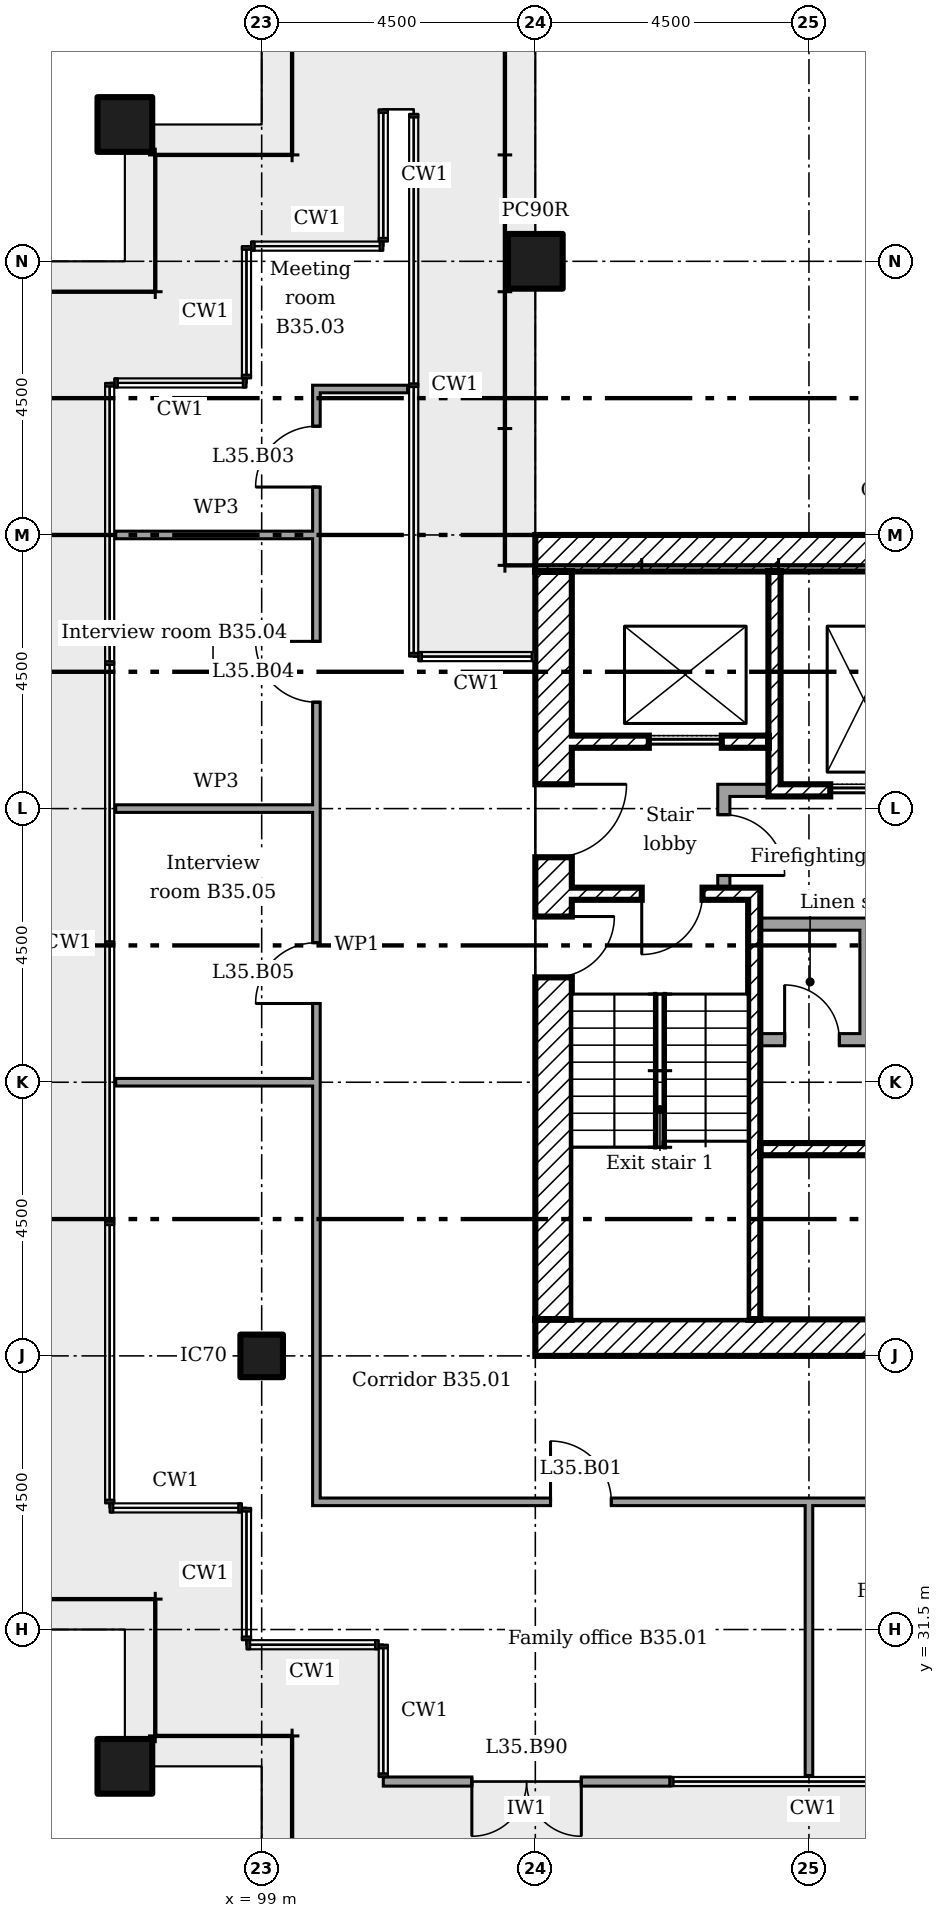
"""IFC4 building model, lengths in metres.
Left out: names, types, materials, properties, quantities, classifications, styles, units other than length and angle.
Written with IfcOpenShell. Run it as: python <this file> out.ifc"""

import sys

from ifc_helpers import new_model, si_unit, direction, frame, frame_2d, origin, origin_2d, place, context, subcontext, project, spatial, rectangle, extrude, element, fill, save


model = new_model("IFC4")
c1 = context("Model", 3, precision=1e-05, world=origin(), true_north=direction((0.0, 1.0)))
c2 = subcontext(c1, "Body", "Model", "MODEL_VIEW")
j1 = project(units=[si_unit("LENGTHUNIT", "METRE"), si_unit("PLANEANGLEUNIT", "RADIAN")], contexts=[c1])
p1 = place(None, origin())
s1 = spatial("IfcSite", under=j1, at=p1, CompositionType="ELEMENT")
p2 = place(p1, origin())
s2 = spatial("IfcBuilding", under=s1, at=p2, CompositionType="ELEMENT")
p3 = place(p2, frame((0.0, 0.0, 143.8)))
s3 = spatial("IfcBuildingStorey", under=s2, at=p3, CompositionType="ELEMENT", Elevation=143.8)
for number, where in (
    (1, (103.5, 54.0, 0.0)),
    (2, (96.75, 56.25, 0.0)),
    (3, (96.75, 29.25, 0.0)),
):
    element("IfcColumn", number, at=place(p3, frame(where)), inside=s3, PredefinedType="COLUMN", context=c2, shape_type="SweptSolid", body=[
        extrude(rectangle(XDim=0.9, YDim=0.9, at=origin_2d()), origin(), (0.0, 0.0, 1.0), 3.6),
    ])
p4 = place(p3, frame((99.0, 36.0, 0.0)))
e4 = element("IfcColumn", 4, at=p4, inside=s3, PredefinedType="COLUMN", context=c2, shape_type="SweptSolid", body=[
    extrude(rectangle(XDim=0.7, YDim=0.7, at=origin_2d()), origin(), (0.0, 0.0, 1.0), 3.6),
])
p5 = place(p3, frame((101.0, 29.0, 0.0)))
e5 = element("IfcWall", 5, at=p5, inside=s3, PredefinedType="SOLIDWALL", context=c2, shape_type="SweptSolid", body=[
    extrude(rectangle(XDim=4.712, YDim=0.15, at=frame_2d((2.356, 0.0))), origin(), (0.0, 0.0, 1.0), 3.45),
])
p6 = place(p5, frame((1.456, 0.0, 0.0)))
e6 = element("IfcOpeningElement", 6, at=p6, cuts=e5, PredefinedType="OPENING", context=c2, shape_type="SweptSolid", body=[
    extrude(rectangle(XDim=1.8, YDim=2.4, at=frame_2d((0.9, 1.2))), frame((0.0, 0.085, 0.0), z_axis=(0.0, -1.0, 0.0), x_axis=(1.0, 0.0, 0.0)), (0.0, 0.0, 1.0), 0.17),
])
for number, where in (
    (7, (103.5, 49.2, 0.0)),
    (8, (103.5, 36.3, 0.0)),
):
    element("IfcWall", number, at=place(p3, frame(where)), inside=s3, PredefinedType="SHEAR", context=c2, shape_type="SweptSolid", body=[
        extrude(rectangle(XDim=12.9, YDim=0.6, at=frame_2d((6.45, 0.0))), origin(), (0.0, 0.0, 1.0), 3.35),
    ])
p7 = place(p3, frame((103.8, 36.6, 0.0), z_axis=(0.0, 0.0, 1.0), x_axis=(0.0, 1.0, 0.0)))
e9 = element("IfcWall", 9, at=p7, inside=s3, PredefinedType="SHEAR", context=c2, shape_type="SweptSolid", body=[
    extrude(rectangle(XDim=12.3, YDim=0.6, at=frame_2d((6.15, 0.0))), origin(), (0.0, 0.0, 1.0), 3.35),
])
p8 = place(p7, frame((7.6, 0.0, 0.0)))
e10 = element("IfcOpeningElement", 10, at=p8, cuts=e9, PredefinedType="OPENING", context=c2, shape_type="SweptSolid", body=[
    extrude(rectangle(XDim=1.2, YDim=2.1, at=frame_2d((0.6, 1.05))), frame((0.0, 0.31, 0.0), z_axis=(0.0, -1.0, 0.0), x_axis=(1.0, 0.0, 0.0)), (0.0, 0.0, 1.0), 0.62),
])
p9 = place(p7, frame((5.625, 0.0, 0.0)))
e11 = element("IfcOpeningElement", 11, at=p9, cuts=e9, PredefinedType="OPENING", context=c2, shape_type="SweptSolid", body=[
    extrude(rectangle(XDim=1.0, YDim=2.1, at=frame_2d((0.5, 1.05))), frame((0.0, 0.31, 0.0), z_axis=(0.0, -1.0, 0.0), x_axis=(1.0, 0.0, 0.0)), (0.0, 0.0, 1.0), 0.62),
])
p10 = place(p3, frame((107.433, 48.9, 0.0), z_axis=(0.0, 0.0, 1.0), x_axis=(0.0, -1.0, 0.0)))
e12 = element("IfcWall", 12, at=p10, inside=s3, PredefinedType="SHEAR", context=c2, shape_type="SweptSolid", body=[
    extrude(rectangle(XDim=3.7, YDim=0.2, at=frame_2d((1.85, 0.0))), origin(), (0.0, 0.0, 1.0), 3.35),
])
p11 = place(p3, frame((106.5, 45.3, 0.0)))
e13 = element("IfcWall", 13, at=p11, inside=s3, PredefinedType="PARTITIONING", context=c2, shape_type="SweptSolid", body=[
    extrude(rectangle(XDim=0.833, YDim=0.2, at=frame_2d((0.417, 0.0))), origin(), (0.0, 0.0, 1.0), 3.35),
])
p12 = place(p3, frame((106.6, 43.7, 0.0), z_axis=(0.0, 0.0, 1.0), x_axis=(0.0, 1.0, 0.0)))
e14 = element("IfcWall", 14, at=p12, inside=s3, PredefinedType="PARTITIONING", context=c2, shape_type="SweptSolid", body=[
    extrude(rectangle(XDim=1.5, YDim=0.2, at=frame_2d((0.75, 0.0))), origin(), (0.0, 0.0, 1.0), 3.35),
])
p13 = place(p12, frame((0.2, 0.0, 0.0)))
e15 = element("IfcOpeningElement", 15, at=p13, cuts=e14, PredefinedType="OPENING", context=c2, shape_type="SweptSolid", body=[
    extrude(rectangle(XDim=1.0, YDim=2.1, at=frame_2d((0.5, 1.05))), frame((0.0, 0.11, 0.0), z_axis=(0.0, -1.0, 0.0), x_axis=(1.0, 0.0, 0.0)), (0.0, 0.0, 1.0), 0.22),
])
p14 = place(p3, frame((104.1, 46.1, 0.0)))
e16 = element("IfcWall", 16, at=p14, inside=s3, PredefinedType="SHEAR", context=c2, shape_type="SweptSolid", body=[
    extrude(rectangle(XDim=3.233, YDim=0.2, at=frame_2d((1.617, 0.0))), origin(), (0.0, 0.0, 1.0), 3.35),
])
p15 = place(p14, frame((1.267, 0.0, 0.0)))
e17 = element("IfcOpeningElement", 17, at=p15, cuts=e16, PredefinedType="OPENING", context=c2, shape_type="SweptSolid", body=[
    extrude(rectangle(XDim=1.2, YDim=2.1, at=frame_2d((0.6, 1.05))), frame((0.0, 0.11, 0.0), z_axis=(0.0, -1.0, 0.0), x_axis=(1.0, 0.0, 0.0)), (0.0, 0.0, 1.0), 0.22),
])
p16 = place(p3, frame((107.533, 45.3, 0.0)))
e18 = element("IfcWall", 18, at=p16, inside=s3, PredefinedType="SHEAR", context=c2, shape_type="SweptSolid", body=[
    extrude(rectangle(XDim=2.733, YDim=0.2, at=frame_2d((1.367, 0.0))), origin(), (0.0, 0.0, 1.0), 3.35),
])
p17 = place(p16, frame((0.817, 0.0, 0.0)))
e19 = element("IfcOpeningElement", 19, at=p17, cuts=e18, PredefinedType="OPENING", context=c2, shape_type="SweptSolid", body=[
    extrude(rectangle(XDim=1.1, YDim=2.1, at=frame_2d((0.55, 1.05))), frame((0.0, 0.11, 0.0), z_axis=(0.0, -1.0, 0.0), x_axis=(1.0, 0.0, 0.0)), (0.0, 0.0, 1.0), 0.22),
])
p18 = place(p3, frame((107.2, 39.4, 0.0)))
e20 = element("IfcWall", 20, at=p18, inside=s3, PredefinedType="SHEAR", context=c2, shape_type="SweptSolid", body=[
    extrude(rectangle(XDim=9.2, YDim=0.2, at=frame_2d((4.6, 0.0))), origin(), (0.0, 0.0, 1.0), 3.35),
])
p19 = place(p18, frame((2.483, 0.0, 0.0)))
e21 = element("IfcOpeningElement", 21, at=p19, cuts=e20, PredefinedType="OPENING", context=c2, shape_type="SweptSolid", body=[
    extrude(rectangle(XDim=0.9, YDim=2.1, at=frame_2d((0.45, 1.05))), frame((0.0, 0.11, 0.0), z_axis=(0.0, -1.0, 0.0), x_axis=(1.0, 0.0, 0.0)), (0.0, 0.0, 1.0), 0.22),
])
p20 = place(p18, frame((6.883, 0.0, 0.0)))
e22 = element("IfcOpeningElement", 22, at=p20, cuts=e20, PredefinedType="OPENING", context=c2, shape_type="SweptSolid", body=[
    extrude(rectangle(XDim=0.9, YDim=2.1, at=frame_2d((0.45, 1.05))), frame((0.0, 0.11, 0.0), z_axis=(0.0, -1.0, 0.0), x_axis=(1.0, 0.0, 0.0)), (0.0, 0.0, 1.0), 0.22),
])
p21 = place(p3, frame((107.1, 36.6, 0.0), z_axis=(0.0, 0.0, 1.0), x_axis=(0.0, 1.0, 0.0)))
e23 = element("IfcWall", 23, at=p21, inside=s3, PredefinedType="SHEAR", context=c2, shape_type="SweptSolid", body=[
    extrude(rectangle(XDim=7.1, YDim=0.2, at=frame_2d((3.55, 0.0))), origin(), (0.0, 0.0, 1.0), 3.35),
])
p22 = place(p3, frame((104.1, 43.6, 0.0)))
e24 = element("IfcWall", 24, at=p22, inside=s3, PredefinedType="SHEAR", context=c2, shape_type="SweptSolid", body=[
    extrude(rectangle(XDim=2.9, YDim=0.2, at=frame_2d((1.45, 0.0))), origin(), (0.0, 0.0, 1.0), 3.35),
])
p23 = place(p22, frame((1.15, 0.0, 0.0)))
e25 = element("IfcOpeningElement", 25, at=p23, cuts=e24, PredefinedType="OPENING", context=c2, shape_type="SweptSolid", body=[
    extrude(rectangle(XDim=1.0, YDim=2.1, at=frame_2d((0.5, 1.05))), frame((0.0, 0.11, 0.0), z_axis=(0.0, -1.0, 0.0), x_axis=(1.0, 0.0, 0.0)), (0.0, 0.0, 1.0), 0.22),
])
p24 = place(p3, frame((107.2, 43.1, 0.0)))
e26 = element("IfcWall", 26, at=p24, inside=s3, PredefinedType="PARTITIONING", context=c2, shape_type="SweptSolid", body=[
    extrude(rectangle(XDim=6.1, YDim=0.2, at=frame_2d((3.05, 0.0))), origin(), (0.0, 0.0, 1.0), 3.35),
])
p25 = place(p24, frame((4.75, 0.0, 0.0)))
e27 = element("IfcOpeningElement", 27, at=p25, cuts=e26, PredefinedType="OPENING", context=c2, shape_type="SweptSolid", body=[
    extrude(rectangle(XDim=0.9, YDim=2.1, at=frame_2d((0.45, 1.05))), frame((0.0, 0.11, 0.0), z_axis=(0.0, -1.0, 0.0), x_axis=(1.0, 0.0, 0.0)), (0.0, 0.0, 1.0), 0.22),
])
p26 = place(p3, frame((107.2, 41.2, 0.0)))
e28 = element("IfcWall", 28, at=p26, inside=s3, PredefinedType="PARTITIONING", context=c2, shape_type="SweptSolid", body=[
    extrude(rectangle(XDim=6.1, YDim=0.2, at=frame_2d((3.05, 0.0))), origin(), (0.0, 0.0, 1.0), 3.35),
])
p27 = place(p26, frame((0.4, 0.0, 0.0)))
e29 = element("IfcOpeningElement", 29, at=p27, cuts=e28, PredefinedType="OPENING", context=c2, shape_type="SweptSolid", body=[
    extrude(rectangle(XDim=0.9, YDim=2.1, at=frame_2d((0.45, 1.05))), frame((0.0, 0.11, 0.0), z_axis=(0.0, -1.0, 0.0), x_axis=(1.0, 0.0, 0.0)), (0.0, 0.0, 1.0), 0.22),
])
p28 = place(p26, frame((2.55, 0.0, 0.0)))
e30 = element("IfcOpeningElement", 30, at=p28, cuts=e28, PredefinedType="OPENING", context=c2, shape_type="SweptSolid", body=[
    extrude(rectangle(XDim=0.9, YDim=2.1, at=frame_2d((0.45, 1.05))), frame((0.0, 0.11, 0.0), z_axis=(0.0, -1.0, 0.0), x_axis=(1.0, 0.0, 0.0)), (0.0, 0.0, 1.0), 0.22),
])
p29 = place(p3, frame((108.9, 41.3, 0.0), z_axis=(0.0, 0.0, 1.0), x_axis=(0.0, 1.0, 0.0)))
e31 = element("IfcWall", 31, at=p29, inside=s3, PredefinedType="PARTITIONING", context=c2, shape_type="SweptSolid", body=[
    extrude(rectangle(XDim=1.7, YDim=0.125, at=frame_2d((0.85, 0.0))), origin(), (0.0, 0.0, 1.0), 3.35),
])
p30 = place(p3, frame((99.837, 33.6, 0.0)))
e32 = element("IfcWall", 32, at=p30, inside=s3, PredefinedType="PARTITIONING", context=c2, shape_type="SweptSolid", body=[
    extrude(rectangle(XDim=12.913, YDim=0.125, at=frame_2d((6.456, 0.0))), origin(), (0.0, 0.0, 1.0), 3.45),
])
p31 = place(p30, frame((3.913, 0.0, 0.0)))
e33 = element("IfcOpeningElement", 33, at=p31, cuts=e32, PredefinedType="OPENING", context=c2, shape_type="SweptSolid", body=[
    extrude(rectangle(XDim=1.0, YDim=2.1, at=frame_2d((0.5, 1.05))), frame((0.0, 0.073, 0.0), z_axis=(0.0, -1.0, 0.0), x_axis=(1.0, 0.0, 0.0)), (0.0, 0.0, 1.0), 0.145),
])
p32 = place(p30, frame((9.539, 0.0, 0.0)))
e34 = element("IfcOpeningElement", 34, at=p32, cuts=e32, PredefinedType="OPENING", context=c2, shape_type="SweptSolid", body=[
    extrude(rectangle(XDim=1.0, YDim=2.1, at=frame_2d((0.5, 1.05))), frame((0.0, 0.073, 0.0), z_axis=(0.0, -1.0, 0.0), x_axis=(1.0, 0.0, 0.0)), (0.0, 0.0, 1.0), 0.145),
])
p33 = place(p3, frame((96.6, 40.5, 0.0)))
e35 = element("IfcWall", 35, at=p33, inside=s3, PredefinedType="PARTITIONING", context=c2, shape_type="SweptSolid", body=[
    extrude(rectangle(XDim=3.3, YDim=0.125, at=frame_2d((1.65, 0.0))), origin(), (0.0, 0.0, 1.0), 2.851),
])
for number, where in (
    (36, (96.6, 45.0, 0.0)),
    (37, (96.6, 49.5, 0.0)),
):
    element("IfcWall", number, at=place(p3, frame(where)), inside=s3, PredefinedType="MOVABLE", context=c2, shape_type="SweptSolid", body=[
        extrude(rectangle(XDim=3.3, YDim=0.125, at=frame_2d((1.65, 0.0))), origin(), (0.0, 0.0, 1.0), 2.851),
    ])
p34 = place(p3, frame((99.837, 51.9, 0.0)))
e38 = element("IfcWall", 38, at=p34, inside=s3, PredefinedType="PARTITIONING", context=c2, shape_type="SweptSolid", body=[
    extrude(rectangle(XDim=1.562, YDim=0.125, at=frame_2d((0.781, 0.0))), origin(), (0.0, 0.0, 1.0), 3.45),
])
p35 = place(p3, frame((99.9, 33.663, 0.0), z_axis=(0.0, 0.0, 1.0), x_axis=(0.0, 1.0, 0.0)))
e39 = element("IfcWall", 39, at=p35, inside=s3, PredefinedType="PARTITIONING", context=c2, shape_type="SweptSolid", body=[
    extrude(rectangle(XDim=18.175, YDim=0.125, at=frame_2d((9.087, 0.0))), origin(), (0.0, 0.0, 1.0), 3.45),
])
p36 = place(p35, frame((16.625, 0.0, 0.0)))
e40 = element("IfcOpeningElement", 40, at=p36, cuts=e39, PredefinedType="OPENING", context=c2, shape_type="SweptSolid", body=[
    extrude(rectangle(XDim=1.0, YDim=2.1, at=frame_2d((0.5, 1.05))), frame((0.0, 0.073, 0.0), z_axis=(0.0, -1.0, 0.0), x_axis=(1.0, 0.0, 0.0)), (0.0, 0.0, 1.0), 0.145),
])
p37 = place(p35, frame((13.087, 0.0, 0.0)))
e41 = element("IfcOpeningElement", 41, at=p37, cuts=e39, PredefinedType="OPENING", context=c2, shape_type="SweptSolid", body=[
    extrude(rectangle(XDim=1.0, YDim=2.1, at=frame_2d((0.5, 1.05))), frame((0.0, 0.073, 0.0), z_axis=(0.0, -1.0, 0.0), x_axis=(1.0, 0.0, 0.0)), (0.0, 0.0, 1.0), 0.145),
])
p38 = place(p35, frame((8.133, 0.0, 0.0)))
e42 = element("IfcOpeningElement", 42, at=p38, cuts=e39, PredefinedType="OPENING", context=c2, shape_type="SweptSolid", body=[
    extrude(rectangle(XDim=1.0, YDim=2.1, at=frame_2d((0.5, 1.05))), frame((0.0, 0.073, 0.0), z_axis=(0.0, -1.0, 0.0), x_axis=(1.0, 0.0, 0.0)), (0.0, 0.0, 1.0), 0.145),
])
p39 = place(p3, frame((108.0, 29.1, 0.0), z_axis=(0.0, 0.0, 1.0), x_axis=(0.0, 1.0, 0.0)))
e43 = element("IfcWall", 43, at=p39, inside=s3, PredefinedType="PARTITIONING", context=c2, shape_type="SweptSolid", body=[
    extrude(rectangle(XDim=4.5, YDim=0.125, at=frame_2d((2.25, 0.0))), origin(), (0.0, 0.0, 1.0), 2.851),
])
p40 = place(p6, frame((1.8, 0.0, 0.0), x_axis=(-1.0, 0.0, 0.0)))
e44 = element("IfcDoor", 44, at=p40, inside=s3, OperationType="DOUBLE_DOOR_DOUBLE_SWING", PredefinedType="NOTDEFINED", context=c2, shape_type="SweptSolid", body=[
    extrude(rectangle(XDim=1.8, YDim=2.4, at=frame_2d((0.9, 1.2))), frame((0.0, 0.025, 0.0), z_axis=(0.0, -1.0, 0.0), x_axis=(1.0, 0.0, 0.0)), (0.0, 0.0, 1.0), 0.05),
])
fill(e6, e44)
p41 = place(p8, frame((1.2, 0.0, 0.0), x_axis=(-1.0, 0.0, 0.0)))
e45 = element("IfcDoor", 45, at=p41, inside=s3, OperationType="SINGLE_SWING_RIGHT", PredefinedType="DOOR", context=c2, shape_type="SweptSolid", body=[
    extrude(rectangle(XDim=1.2, YDim=2.1, at=frame_2d((0.6, 1.05))), frame((0.0, 0.025, 0.0), z_axis=(0.0, -1.0, 0.0), x_axis=(1.0, 0.0, 0.0)), (0.0, 0.0, 1.0), 0.05),
])
fill(e10, e45)
p42 = place(p23, frame((1.0, 0.0, 0.0), x_axis=(-1.0, 0.0, 0.0)))
e46 = element("IfcDoor", 46, at=p42, inside=s3, OperationType="SINGLE_SWING_LEFT", PredefinedType="DOOR", context=c2, shape_type="SweptSolid", body=[
    extrude(rectangle(XDim=1.0, YDim=2.1, at=frame_2d((0.5, 1.05))), frame((0.0, 0.025, 0.0), z_axis=(0.0, -1.0, 0.0), x_axis=(1.0, 0.0, 0.0)), (0.0, 0.0, 1.0), 0.05),
])
fill(e25, e46)
p43 = place(p9, frame((1.0, 0.0, 0.0), x_axis=(-1.0, 0.0, 0.0)))
e47 = element("IfcDoor", 47, at=p43, inside=s3, OperationType="SINGLE_SWING_RIGHT", PredefinedType="DOOR", context=c2, shape_type="SweptSolid", body=[
    extrude(rectangle(XDim=1.0, YDim=2.1, at=frame_2d((0.5, 1.05))), frame((0.0, 0.025, 0.0), z_axis=(0.0, -1.0, 0.0), x_axis=(1.0, 0.0, 0.0)), (0.0, 0.0, 1.0), 0.05),
])
fill(e11, e47)
p44 = place(p13, frame((1.0, 0.0, 0.0), x_axis=(-1.0, 0.0, 0.0)))
e48 = element("IfcDoor", 48, at=p44, inside=s3, OperationType="SINGLE_SWING_LEFT", PredefinedType="DOOR", context=c2, shape_type="SweptSolid", body=[
    extrude(rectangle(XDim=1.0, YDim=2.1, at=frame_2d((0.5, 1.05))), frame((0.0, 0.025, 0.0), z_axis=(0.0, -1.0, 0.0), x_axis=(1.0, 0.0, 0.0)), (0.0, 0.0, 1.0), 0.05),
])
fill(e15, e48)
p45 = place(p27, origin())
e49 = element("IfcDoor", 49, at=p45, inside=s3, OperationType="SINGLE_SWING_RIGHT", PredefinedType="DOOR", context=c2, shape_type="SweptSolid", body=[
    extrude(rectangle(XDim=0.9, YDim=2.1, at=frame_2d((0.45, 1.05))), frame((0.0, 0.025, 0.0), z_axis=(0.0, -1.0, 0.0), x_axis=(1.0, 0.0, 0.0)), (0.0, 0.0, 1.0), 0.05),
])
fill(e29, e49)
p46 = place(p17, origin())
e50 = element("IfcDoor", 50, at=p46, inside=s3, OperationType="SLIDING_TO_LEFT", PredefinedType="DOOR", context=c2, shape_type="SweptSolid", body=[
    extrude(rectangle(XDim=1.1, YDim=2.1, at=frame_2d((0.55, 1.05))), frame((0.0, 0.025, 0.0), z_axis=(0.0, -1.0, 0.0), x_axis=(1.0, 0.0, 0.0)), (0.0, 0.0, 1.0), 0.05),
])
fill(e19, e50)
p47 = place(p15, origin())
e51 = element("IfcDoor", 51, at=p47, inside=s3, OperationType="SLIDING_TO_LEFT", PredefinedType="DOOR", context=c2, shape_type="SweptSolid", body=[
    extrude(rectangle(XDim=1.2, YDim=2.1, at=frame_2d((0.6, 1.05))), frame((0.0, 0.025, 0.0), z_axis=(0.0, -1.0, 0.0), x_axis=(1.0, 0.0, 0.0)), (0.0, 0.0, 1.0), 0.05),
])
fill(e17, e51)
p48 = place(p31, origin())
e52 = element("IfcDoor", 52, at=p48, inside=s3, OperationType="SINGLE_SWING_RIGHT", PredefinedType="DOOR", context=c2, shape_type="SweptSolid", body=[
    extrude(rectangle(XDim=1.0, YDim=2.1, at=frame_2d((0.5, 1.05))), frame((0.0, 0.025, 0.0), z_axis=(0.0, -1.0, 0.0), x_axis=(1.0, 0.0, 0.0)), (0.0, 0.0, 1.0), 0.05),
])
fill(e33, e52)
p49 = place(p36, origin())
e53 = element("IfcDoor", 53, at=p49, inside=s3, OperationType="SINGLE_SWING_RIGHT", PredefinedType="DOOR", context=c2, shape_type="SweptSolid", body=[
    extrude(rectangle(XDim=1.0, YDim=2.1, at=frame_2d((0.5, 1.05))), frame((0.0, 0.025, 0.0), z_axis=(0.0, -1.0, 0.0), x_axis=(1.0, 0.0, 0.0)), (0.0, 0.0, 1.0), 0.05),
])
fill(e40, e53)
p50 = place(p37, origin())
e54 = element("IfcDoor", 54, at=p50, inside=s3, OperationType="SINGLE_SWING_LEFT", PredefinedType="DOOR", context=c2, shape_type="SweptSolid", body=[
    extrude(rectangle(XDim=1.0, YDim=2.1, at=frame_2d((0.5, 1.05))), frame((0.0, 0.025, 0.0), z_axis=(0.0, -1.0, 0.0), x_axis=(1.0, 0.0, 0.0)), (0.0, 0.0, 1.0), 0.05),
])
fill(e41, e54)
p51 = place(p38, origin())
e55 = element("IfcDoor", 55, at=p51, inside=s3, OperationType="SINGLE_SWING_RIGHT", PredefinedType="DOOR", context=c2, shape_type="SweptSolid", body=[
    extrude(rectangle(XDim=1.0, YDim=2.1, at=frame_2d((0.5, 1.05))), frame((0.0, 0.025, 0.0), z_axis=(0.0, -1.0, 0.0), x_axis=(1.0, 0.0, 0.0)), (0.0, 0.0, 1.0), 0.05),
])
fill(e42, e55)
save(model, sys.argv[1])
